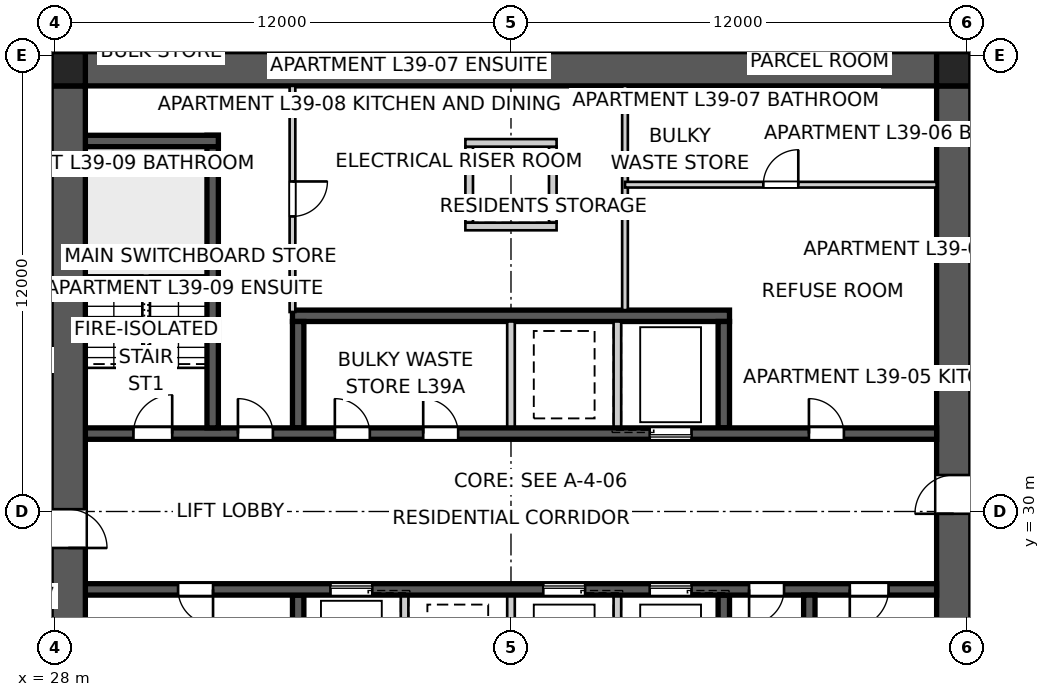
"""IFC4 building model, lengths in metres.
Left out: names, types, materials, properties, quantities, classifications, styles, units other than length and angle.
Written with IfcOpenShell. Run it as: python <this file> out.ifc"""

import sys

from ifc_helpers import new_model, si_unit, direction, frame, frame_2d, origin, origin_2d, place, context, subcontext, project, spatial, polyline, rectangle, outline, extrude, element, fill, save


model = new_model("IFC4")
c1 = context("Model", 3, precision=1e-05, world=origin(), true_north=direction((0.0, 1.0)))
c2 = subcontext(c1, "Body", "Model", "MODEL_VIEW")
j1 = project(units=[si_unit("LENGTHUNIT", "METRE"), si_unit("PLANEANGLEUNIT", "RADIAN")], contexts=[c1])
p1 = place(None, origin())
s1 = spatial("IfcSite", under=j1, at=p1, CompositionType="ELEMENT")
p2 = place(p1, origin())
s2 = spatial("IfcBuilding", under=s1, at=p2, CompositionType="ELEMENT")
p3 = place(p2, frame((0.0, 0.0, 143.8)))
s3 = spatial("IfcBuildingStorey", under=s2, at=p3, CompositionType="ELEMENT", Elevation=143.8)
p4 = place(p3, frame((28.8, 41.65, 0.0), z_axis=(0.0, 0.0, 1.0), x_axis=(1.0, 0.0, 0.0)))
e1 = element("IfcWall", 1, at=p4, inside=s3, PredefinedType="SHEAR", context=c2, shape_type="SweptSolid", body=[
    extrude(outline(polyline([(0.0, -0.45), (22.4, -0.45), (22.4, -0.025), (22.85, -0.025), (22.85, 0.025), (22.4, 0.025), (22.4, 0.45), (0.0, 0.45), (0.0, 0.025), (-0.45, 0.025), (-0.45, -0.025), (0.0, -0.025), (0.0, -0.45)])), origin(), (0.0, 0.0, 1.0), 3.4),
])
p5 = place(p3, frame((51.65, 18.8, 0.0), z_axis=(0.0, 0.0, 1.0), x_axis=(0.0, 1.0, 0.0)))
e2 = element("IfcWall", 2, at=p5, inside=s3, PredefinedType="SHEAR", context=c2, shape_type="SweptSolid", body=[
    extrude(outline(polyline([(0.0, -0.45), (22.4, -0.45), (22.4, -0.025), (22.85, -0.025), (22.85, 0.025), (22.4, 0.025), (22.4, 0.45), (0.0, 0.45), (0.0, 0.025), (-0.45, 0.025), (-0.45, -0.025), (0.0, -0.025), (0.0, -0.45)])), origin(), (0.0, 0.0, 1.0), 3.4),
])
p6 = place(p5, frame((11.14, 0.0, 0.0)))
e3 = element("IfcOpeningElement", 3, at=p6, cuts=e2, PredefinedType="OPENING", context=c2, shape_type="SweptSolid", body=[
    extrude(rectangle(XDim=1.02, YDim=2.4, at=frame_2d((0.51, 1.2))), frame((0.0, 0.46, 0.0), z_axis=(0.0, -1.0, 0.0), x_axis=(1.0, 0.0, 0.0)), (0.0, 0.0, 1.0), 0.92),
])
p7 = place(p3, frame((28.35, 41.2, 0.0), z_axis=(0.0, 0.0, 1.0), x_axis=(0.0, -1.0, 0.0)))
e4 = element("IfcWall", 4, at=p7, inside=s3, PredefinedType="SHEAR", context=c2, shape_type="SweptSolid", body=[
    extrude(outline(polyline([(0.0, -0.45), (22.4, -0.45), (22.4, -0.025), (22.85, -0.025), (22.85, 0.025), (22.4, 0.025), (22.4, 0.45), (0.0, 0.45), (0.0, 0.025), (-0.45, 0.025), (-0.45, -0.025), (0.0, -0.025), (0.0, -0.45)])), origin(), (0.0, 0.0, 1.0), 3.4),
])
p8 = place(p7, frame((11.14, 0.0, 0.0)))
e5 = element("IfcOpeningElement", 5, at=p8, cuts=e4, PredefinedType="OPENING", context=c2, shape_type="SweptSolid", body=[
    extrude(rectangle(XDim=1.02, YDim=2.4, at=frame_2d((0.51, 1.2))), frame((0.0, 0.46, 0.0), z_axis=(0.0, -1.0, 0.0), x_axis=(1.0, 0.0, 0.0)), (0.0, 0.0, 1.0), 0.92),
])
p9 = place(p3, frame((28.8, 32.05, 0.0), z_axis=(0.0, 0.0, 1.0), x_axis=(1.0, 0.0, 0.0)))
e6 = element("IfcWall", 6, at=p9, inside=s3, PredefinedType="SHEAR", context=c2, shape_type="SweptSolid", body=[
    extrude(rectangle(XDim=22.4, YDim=0.3, at=frame_2d((11.2, 0.0))), origin(), (0.0, 0.0, 1.0), 3.4),
])
p10 = place(p9, frame((19.04, 0.0, 0.0)))
e7 = element("IfcOpeningElement", 7, at=p10, cuts=e6, PredefinedType="OPENING", context=c2, shape_type="SweptSolid", body=[
    extrude(rectangle(XDim=0.92, YDim=2.1, at=frame_2d((0.46, 1.05))), frame((0.0, 0.16, 0.0), z_axis=(0.0, -1.0, 0.0), x_axis=(1.0, 0.0, 0.0)), (0.0, 0.0, 1.0), 0.32),
])
p11 = place(p9, frame((1.265, 0.0, 0.0)))
e8 = element("IfcOpeningElement", 8, at=p11, cuts=e6, PredefinedType="OPENING", context=c2, shape_type="SweptSolid", body=[
    extrude(rectangle(XDim=1.02, YDim=2.1, at=frame_2d((0.51, 1.05))), frame((0.0, 0.16, 0.0), z_axis=(0.0, -1.0, 0.0), x_axis=(1.0, 0.0, 0.0)), (0.0, 0.0, 1.0), 0.32),
])
p12 = place(p9, frame((4.015, 0.0, 0.0)))
e9 = element("IfcOpeningElement", 9, at=p12, cuts=e6, PredefinedType="OPENING", context=c2, shape_type="SweptSolid", body=[
    extrude(rectangle(XDim=0.92, YDim=2.1, at=frame_2d((0.46, 1.05))), frame((0.0, 0.16, 0.0), z_axis=(0.0, -1.0, 0.0), x_axis=(1.0, 0.0, 0.0)), (0.0, 0.0, 1.0), 0.32),
])
p13 = place(p9, frame((6.565, 0.0, 0.0)))
e10 = element("IfcOpeningElement", 10, at=p13, cuts=e6, PredefinedType="OPENING", context=c2, shape_type="SweptSolid", body=[
    extrude(rectangle(XDim=0.92, YDim=2.1, at=frame_2d((0.46, 1.05))), frame((0.0, 0.16, 0.0), z_axis=(0.0, -1.0, 0.0), x_axis=(1.0, 0.0, 0.0)), (0.0, 0.0, 1.0), 0.32),
])
p14 = place(p9, frame((8.89, 0.0, 0.0)))
e11 = element("IfcOpeningElement", 11, at=p14, cuts=e6, PredefinedType="OPENING", context=c2, shape_type="SweptSolid", body=[
    extrude(rectangle(XDim=0.92, YDim=2.1, at=frame_2d((0.46, 1.05))), frame((0.0, 0.16, 0.0), z_axis=(0.0, -1.0, 0.0), x_axis=(1.0, 0.0, 0.0)), (0.0, 0.0, 1.0), 0.32),
])
p15 = place(p9, frame((14.85, 0.0, 0.0)))
e12 = element("IfcOpeningElement", 12, at=p15, cuts=e6, PredefinedType="OPENING", context=c2, shape_type="SweptSolid", body=[
    extrude(rectangle(XDim=1.1, YDim=2.1, at=frame_2d((0.55, 1.05))), frame((0.0, 0.16, 0.0), z_axis=(0.0, -1.0, 0.0), x_axis=(1.0, 0.0, 0.0)), (0.0, 0.0, 1.0), 0.32),
])
p16 = place(p3, frame((51.2, 27.95, 0.0), z_axis=(0.0, 0.0, 1.0), x_axis=(-1.0, 0.0, 0.0)))
e13 = element("IfcWall", 13, at=p16, inside=s3, PredefinedType="SHEAR", context=c2, shape_type="SweptSolid", body=[
    extrude(rectangle(XDim=22.4, YDim=0.3, at=frame_2d((11.2, 0.0))), origin(), (0.0, 0.0, 1.0), 3.4),
])
p17 = place(p16, frame((19.04, 0.0, 0.0)))
e14 = element("IfcOpeningElement", 14, at=p17, cuts=e13, PredefinedType="OPENING", context=c2, shape_type="SweptSolid", body=[
    extrude(rectangle(XDim=0.92, YDim=2.1, at=frame_2d((0.46, 1.05))), frame((0.0, 0.16, 0.0), z_axis=(0.0, -1.0, 0.0), x_axis=(1.0, 0.0, 0.0)), (0.0, 0.0, 1.0), 0.32),
])
p18 = place(p16, frame((1.265, 0.0, 0.0)))
e15 = element("IfcOpeningElement", 15, at=p18, cuts=e13, PredefinedType="OPENING", context=c2, shape_type="SweptSolid", body=[
    extrude(rectangle(XDim=1.02, YDim=2.1, at=frame_2d((0.51, 1.05))), frame((0.0, 0.16, 0.0), z_axis=(0.0, -1.0, 0.0), x_axis=(1.0, 0.0, 0.0)), (0.0, 0.0, 1.0), 0.32),
])
p19 = place(p16, frame((4.015, 0.0, 0.0)))
e16 = element("IfcOpeningElement", 16, at=p19, cuts=e13, PredefinedType="OPENING", context=c2, shape_type="SweptSolid", body=[
    extrude(rectangle(XDim=0.92, YDim=2.1, at=frame_2d((0.46, 1.05))), frame((0.0, 0.16, 0.0), z_axis=(0.0, -1.0, 0.0), x_axis=(1.0, 0.0, 0.0)), (0.0, 0.0, 1.0), 0.32),
])
p20 = place(p16, frame((6.45, 0.0, 0.0)))
e17 = element("IfcOpeningElement", 17, at=p20, cuts=e13, PredefinedType="OPENING", context=c2, shape_type="SweptSolid", body=[
    extrude(rectangle(XDim=1.1, YDim=2.1, at=frame_2d((0.55, 1.05))), frame((0.0, 0.16, 0.0), z_axis=(0.0, -1.0, 0.0), x_axis=(1.0, 0.0, 0.0)), (0.0, 0.0, 1.0), 0.32),
])
p21 = place(p16, frame((9.25, 0.0, 0.0)))
e18 = element("IfcOpeningElement", 18, at=p21, cuts=e13, PredefinedType="OPENING", context=c2, shape_type="SweptSolid", body=[
    extrude(rectangle(XDim=1.1, YDim=2.1, at=frame_2d((0.55, 1.05))), frame((0.0, 0.16, 0.0), z_axis=(0.0, -1.0, 0.0), x_axis=(1.0, 0.0, 0.0)), (0.0, 0.0, 1.0), 0.32),
])
p22 = place(p16, frame((14.85, 0.0, 0.0)))
e19 = element("IfcOpeningElement", 19, at=p22, cuts=e13, PredefinedType="OPENING", context=c2, shape_type="SweptSolid", body=[
    extrude(rectangle(XDim=1.1, YDim=2.1, at=frame_2d((0.55, 1.05))), frame((0.0, 0.16, 0.0), z_axis=(0.0, -1.0, 0.0), x_axis=(1.0, 0.0, 0.0)), (0.0, 0.0, 1.0), 0.32),
])
p23 = place(p3, frame((34.25, 35.15, 0.0), z_axis=(0.0, 0.0, 1.0), x_axis=(1.0, 0.0, 0.0)))
e20 = element("IfcWall", 20, at=p23, inside=s3, PredefinedType="SHEAR", context=c2, shape_type="SweptSolid", body=[
    extrude(rectangle(XDim=11.5, YDim=0.3, at=frame_2d((5.75, 0.0))), origin(), (0.0, 0.0, 1.0), 3.4),
])
for number, where, z_axis, x_axis in (
    (21, (34.4, 32.2, 0.0), (0.0, 0.0, 1.0), (0.0, 1.0, 0.0)),
    (22, (45.6, 27.8, 0.0), (0.0, 0.0, 1.0), (0.0, -1.0, 0.0)),
):
    element("IfcWall", number, at=place(p3, frame(where, z_axis=z_axis, x_axis=x_axis)), inside=s3, PredefinedType="SHEAR", context=c2, shape_type="SweptSolid", body=[
        extrude(rectangle(XDim=2.8, YDim=0.3, at=frame_2d((1.4, 0.0))), origin(), (0.0, 0.0, 1.0), 3.4),
    ])
for number, where, z_axis, x_axis in (
    (23, (42.8, 27.8, 0.0), (0.0, 0.0, 1.0), (0.0, -1.0, 0.0)),
    (24, (40.0, 32.2, 0.0), (0.0, 0.0, 1.0), (0.0, 1.0, 0.0)),
    (25, (40.0, 27.8, 0.0), (0.0, 0.0, 1.0), (0.0, -1.0, 0.0)),
    (26, (42.8, 32.2, 0.0), (0.0, 0.0, 1.0), (0.0, 1.0, 0.0)),
    (27, (37.2, 27.8, 0.0), (0.0, 0.0, 1.0), (0.0, -1.0, 0.0)),
):
    element("IfcWall", number, at=place(p3, frame(where, z_axis=z_axis, x_axis=x_axis)), inside=s3, PredefinedType="SOLIDWALL", context=c2, shape_type="SweptSolid", body=[
        extrude(rectangle(XDim=2.8, YDim=0.2, at=frame_2d((1.4, 0.0))), origin(), (0.0, 0.0, 1.0), 3.4),
    ])
for number, where, z_axis, x_axis in (
    (28, (45.6, 32.2, 0.0), (0.0, 0.0, 1.0), (0.0, 1.0, 0.0)),
    (29, (34.4, 27.8, 0.0), (0.0, 0.0, 1.0), (0.0, -1.0, 0.0)),
):
    element("IfcWall", number, at=place(p3, frame(where, z_axis=z_axis, x_axis=x_axis)), inside=s3, PredefinedType="SHEAR", context=c2, shape_type="SweptSolid", body=[
        extrude(rectangle(XDim=2.8, YDim=0.3, at=frame_2d((1.4, 0.0))), origin(), (0.0, 0.0, 1.0), 3.4),
    ])
p24 = place(p3, frame((32.15, 32.2, 0.0), z_axis=(0.0, 0.0, 1.0), x_axis=(0.0, 1.0, 0.0)))
e30 = element("IfcWall", 30, at=p24, inside=s3, PredefinedType="SHEAR", context=c2, shape_type="SweptSolid", body=[
    extrude(rectangle(XDim=7.7, YDim=0.3, at=frame_2d((3.85, 0.0))), origin(), (0.0, 0.0, 1.0), 3.4),
])
p25 = place(p3, frame((28.8, 39.75, 0.0), z_axis=(0.0, 0.0, 1.0), x_axis=(1.0, 0.0, 0.0)))
e31 = element("IfcWall", 31, at=p25, inside=s3, PredefinedType="SHEAR", context=c2, shape_type="SweptSolid", body=[
    extrude(rectangle(XDim=3.5, YDim=0.3, at=frame_2d((1.75, 0.0))), origin(), (0.0, 0.0, 1.0), 3.4),
])
p26 = place(p3, frame((47.85, 27.8, 0.0), z_axis=(0.0, 0.0, 1.0), x_axis=(0.0, -1.0, 0.0)))
e32 = element("IfcWall", 32, at=p26, inside=s3, PredefinedType="SHEAR", context=c2, shape_type="SweptSolid", body=[
    extrude(rectangle(XDim=7.7, YDim=0.3, at=frame_2d((3.85, 0.0))), origin(), (0.0, 0.0, 1.0), 3.4),
])
for number, where, z_axis, x_axis in (
    (33, (38.9, 37.6, 0.0), (0.0, 0.0, 1.0), (0.0, 1.0, 0.0)),
    (34, (41.1, 37.6, 0.0), (0.0, 0.0, 1.0), (0.0, 1.0, 0.0)),
):
    element("IfcWall", number, at=place(p3, frame(where, z_axis=z_axis, x_axis=x_axis)), inside=s3, PredefinedType="SOLIDWALL", context=c2, shape_type="SweptSolid", body=[
        extrude(rectangle(XDim=2.0, YDim=0.2, at=frame_2d((1.0, 0.0))), origin(), (0.0, 0.0, 1.0), 3.4),
    ])
for number, where, z_axis, x_axis in (
    (35, (38.8, 37.5, 0.0), (0.0, 0.0, 1.0), (1.0, 0.0, 0.0)),
    (36, (38.8, 39.7, 0.0), (0.0, 0.0, 1.0), (1.0, 0.0, 0.0)),
):
    element("IfcWall", number, at=place(p3, frame(where, z_axis=z_axis, x_axis=x_axis)), inside=s3, PredefinedType="SOLIDWALL", context=c2, shape_type="SweptSolid", body=[
        extrude(rectangle(XDim=2.4, YDim=0.2, at=frame_2d((1.2, 0.0))), origin(), (0.0, 0.0, 1.0), 3.4),
    ])
for number, where, z_axis, x_axis in (
    (37, (51.65, 41.65, 0.0), (0.0, 0.0, 1.0), (1.0, 0.0, 0.0)),
    (38, (28.35, 41.65, 0.0), (0.0, 0.0, 1.0), (1.0, 0.0, 0.0)),
):
    element("IfcColumn", number, at=place(p3, frame(where, z_axis=z_axis, x_axis=x_axis)), inside=s3, PredefinedType="COLUMN", context=c2, shape_type="SweptSolid", body=[
        extrude(rectangle(XDim=0.9, YDim=0.9, at=origin_2d()), origin(), (0.0, 0.0, 1.0), 3.4),
    ])
p27 = place(p3, frame((34.25, 41.2, 0.0), z_axis=(0.0, 0.0, 1.0), x_axis=(0.0, -1.0, 0.0)))
e39 = element("IfcWall", 39, at=p27, inside=s3, PredefinedType="SOLIDWALL", context=c2, shape_type="SweptSolid", body=[
    extrude(rectangle(XDim=5.95, YDim=0.15, at=frame_2d((2.975, 0.0))), origin(), (0.0, 0.0, 1.0), 3.25),
])
p28 = place(p27, frame((2.515, 0.0, 0.0)))
e40 = element("IfcOpeningElement", 40, at=p28, cuts=e39, PredefinedType="OPENING", context=c2, shape_type="SweptSolid", body=[
    extrude(rectangle(XDim=0.92, YDim=2.1, at=frame_2d((0.46, 1.05))), frame((0.0, 0.085, 0.0), z_axis=(0.0, -1.0, 0.0), x_axis=(1.0, 0.0, 0.0)), (0.0, 0.0, 1.0), 0.17),
])
p29 = place(p3, frame((43.0, 41.2, 0.0), z_axis=(0.0, 0.0, 1.0), x_axis=(0.0, -1.0, 0.0)))
e41 = element("IfcWall", 41, at=p29, inside=s3, PredefinedType="SOLIDWALL", context=c2, shape_type="SweptSolid", body=[
    extrude(rectangle(XDim=5.9, YDim=0.15, at=frame_2d((2.95, 0.0))), origin(), (0.0, 0.0, 1.0), 3.25),
])
p30 = place(p3, frame((43.0, 38.6, 0.0), z_axis=(0.0, 0.0, 1.0), x_axis=(1.0, 0.0, 0.0)))
e42 = element("IfcWall", 42, at=p30, inside=s3, PredefinedType="SOLIDWALL", context=c2, shape_type="SweptSolid", body=[
    extrude(rectangle(XDim=8.2, YDim=0.15, at=frame_2d((4.1, 0.0))), origin(), (0.0, 0.0, 1.0), 3.25),
])
p31 = place(p30, frame((3.64, 0.0, 0.0)))
e43 = element("IfcOpeningElement", 43, at=p31, cuts=e42, PredefinedType="OPENING", context=c2, shape_type="SweptSolid", body=[
    extrude(rectangle(XDim=0.92, YDim=2.1, at=frame_2d((0.46, 1.05))), frame((0.0, 0.085, 0.0), z_axis=(0.0, -1.0, 0.0), x_axis=(1.0, 0.0, 0.0)), (0.0, 0.0, 1.0), 0.17),
])
p32 = place(p3, frame((27.9, 44.35, 0.0), z_axis=(0.0, 0.0, 1.0), x_axis=(0.0, -1.0, 0.0)))
e44 = element("IfcWall", 44, at=p32, inside=s3, PredefinedType="PARTITIONING", context=c2, shape_type="SweptSolid", body=[
    extrude(rectangle(XDim=2.3, YDim=0.2, at=frame_2d((1.15, 0.0))), origin(), (0.0, 0.0, 1.0), 3.25),
])
p33 = place(p3, frame((52.1, 41.18, 0.0), z_axis=(0.0, 0.0, 1.0), x_axis=(0.0, 1.0, 0.0)))
e45 = element("IfcWall", 45, at=p33, inside=s3, PredefinedType="PARTITIONING", context=c2, shape_type="SweptSolid", body=[
    extrude(rectangle(XDim=3.17, YDim=0.2, at=frame_2d((1.585, 0.0))), origin(), (0.0, 0.0, 1.0), 3.25),
])
p34 = place(p10, origin())
e46 = element("IfcDoor", 46, at=p34, inside=s3, OperationType="SINGLE_SWING_LEFT", PredefinedType="DOOR", context=c2, shape_type="SweptSolid", body=[
    extrude(rectangle(XDim=0.92, YDim=2.1, at=frame_2d((0.46, 1.05))), frame((0.0, 0.025, 0.0), z_axis=(0.0, -1.0, 0.0), x_axis=(1.0, 0.0, 0.0)), (0.0, 0.0, 1.0), 0.05),
])
fill(e7, e46)
p35 = place(p17, origin())
e47 = element("IfcDoor", 47, at=p35, inside=s3, OperationType="SINGLE_SWING_LEFT", PredefinedType="DOOR", context=c2, shape_type="SweptSolid", body=[
    extrude(rectangle(XDim=0.92, YDim=2.1, at=frame_2d((0.46, 1.05))), frame((0.0, 0.025, 0.0), z_axis=(0.0, -1.0, 0.0), x_axis=(1.0, 0.0, 0.0)), (0.0, 0.0, 1.0), 0.05),
])
fill(e14, e47)
p36 = place(p18, origin())
e48 = element("IfcDoor", 48, at=p36, inside=s3, OperationType="SINGLE_SWING_RIGHT", PredefinedType="DOOR", context=c2, shape_type="SweptSolid", body=[
    extrude(rectangle(XDim=1.02, YDim=2.1, at=frame_2d((0.51, 1.05))), frame((0.0, 0.025, 0.0), z_axis=(0.0, -1.0, 0.0), x_axis=(1.0, 0.0, 0.0)), (0.0, 0.0, 1.0), 0.05),
])
fill(e15, e48)
p37 = place(p11, origin())
e49 = element("IfcDoor", 49, at=p37, inside=s3, OperationType="SINGLE_SWING_RIGHT", PredefinedType="DOOR", context=c2, shape_type="SweptSolid", body=[
    extrude(rectangle(XDim=1.02, YDim=2.1, at=frame_2d((0.51, 1.05))), frame((0.0, 0.025, 0.0), z_axis=(0.0, -1.0, 0.0), x_axis=(1.0, 0.0, 0.0)), (0.0, 0.0, 1.0), 0.05),
])
fill(e8, e49)
p38 = place(p12, origin())
e50 = element("IfcDoor", 50, at=p38, inside=s3, OperationType="SINGLE_SWING_LEFT", PredefinedType="DOOR", context=c2, shape_type="SweptSolid", body=[
    extrude(rectangle(XDim=0.92, YDim=2.1, at=frame_2d((0.46, 1.05))), frame((0.0, 0.025, 0.0), z_axis=(0.0, -1.0, 0.0), x_axis=(1.0, 0.0, 0.0)), (0.0, 0.0, 1.0), 0.05),
])
fill(e9, e50)
p39 = place(p19, origin())
e51 = element("IfcDoor", 51, at=p39, inside=s3, OperationType="SINGLE_SWING_RIGHT", PredefinedType="DOOR", context=c2, shape_type="SweptSolid", body=[
    extrude(rectangle(XDim=0.92, YDim=2.1, at=frame_2d((0.46, 1.05))), frame((0.0, 0.025, 0.0), z_axis=(0.0, -1.0, 0.0), x_axis=(1.0, 0.0, 0.0)), (0.0, 0.0, 1.0), 0.05),
])
fill(e16, e51)
p40 = place(p31, origin())
e52 = element("IfcDoor", 52, at=p40, inside=s3, OperationType="SINGLE_SWING_RIGHT", PredefinedType="DOOR", context=c2, shape_type="SweptSolid", body=[
    extrude(rectangle(XDim=0.92, YDim=2.1, at=frame_2d((0.46, 1.05))), frame((0.0, 0.025, 0.0), z_axis=(0.0, -1.0, 0.0), x_axis=(1.0, 0.0, 0.0)), (0.0, 0.0, 1.0), 0.05),
])
fill(e43, e52)
p41 = place(p28, origin())
e53 = element("IfcDoor", 53, at=p41, inside=s3, OperationType="SINGLE_SWING_LEFT", PredefinedType="DOOR", context=c2, shape_type="SweptSolid", body=[
    extrude(rectangle(XDim=0.92, YDim=2.1, at=frame_2d((0.46, 1.05))), frame((0.0, 0.025, 0.0), z_axis=(0.0, -1.0, 0.0), x_axis=(1.0, 0.0, 0.0)), (0.0, 0.0, 1.0), 0.05),
])
fill(e40, e53)
p42 = place(p13, origin())
e54 = element("IfcDoor", 54, at=p42, inside=s3, OperationType="SINGLE_SWING_LEFT", PredefinedType="DOOR", context=c2, shape_type="SweptSolid", body=[
    extrude(rectangle(XDim=0.92, YDim=2.1, at=frame_2d((0.46, 1.05))), frame((0.0, 0.025, 0.0), z_axis=(0.0, -1.0, 0.0), x_axis=(1.0, 0.0, 0.0)), (0.0, 0.0, 1.0), 0.05),
])
fill(e10, e54)
p43 = place(p14, origin())
e55 = element("IfcDoor", 55, at=p43, inside=s3, OperationType="SINGLE_SWING_LEFT", PredefinedType="DOOR", context=c2, shape_type="SweptSolid", body=[
    extrude(rectangle(XDim=0.92, YDim=2.1, at=frame_2d((0.46, 1.05))), frame((0.0, 0.025, 0.0), z_axis=(0.0, -1.0, 0.0), x_axis=(1.0, 0.0, 0.0)), (0.0, 0.0, 1.0), 0.05),
])
fill(e11, e55)
p44 = place(p6, origin())
e56 = element("IfcDoor", 56, at=p44, inside=s3, OperationType="SINGLE_SWING_LEFT", PredefinedType="DOOR", context=c2, shape_type="SweptSolid", body=[
    extrude(rectangle(XDim=1.02, YDim=2.4, at=frame_2d((0.51, 1.2))), frame((0.0, 0.025, 0.0), z_axis=(0.0, -1.0, 0.0), x_axis=(1.0, 0.0, 0.0)), (0.0, 0.0, 1.0), 0.05),
])
fill(e3, e56)
p45 = place(p8, origin())
e57 = element("IfcDoor", 57, at=p45, inside=s3, OperationType="SINGLE_SWING_RIGHT", PredefinedType="DOOR", context=c2, shape_type="SweptSolid", body=[
    extrude(rectangle(XDim=1.02, YDim=2.4, at=frame_2d((0.51, 1.2))), frame((0.0, 0.025, 0.0), z_axis=(0.0, -1.0, 0.0), x_axis=(1.0, 0.0, 0.0)), (0.0, 0.0, 1.0), 0.05),
])
fill(e5, e57)
p46 = place(p20, origin())
e58 = element("IfcDoor", 58, at=p46, inside=s3, OperationType="SLIDING_TO_LEFT", PredefinedType="DOOR", context=c2, shape_type="SweptSolid", body=[
    extrude(rectangle(XDim=1.1, YDim=2.1, at=frame_2d((0.55, 1.05))), frame((0.0, 0.025, 0.0), z_axis=(0.0, -1.0, 0.0), x_axis=(1.0, 0.0, 0.0)), (0.0, 0.0, 1.0), 0.05),
])
fill(e17, e58)
p47 = place(p21, origin())
e59 = element("IfcDoor", 59, at=p47, inside=s3, OperationType="SLIDING_TO_LEFT", PredefinedType="DOOR", context=c2, shape_type="SweptSolid", body=[
    extrude(rectangle(XDim=1.1, YDim=2.1, at=frame_2d((0.55, 1.05))), frame((0.0, 0.025, 0.0), z_axis=(0.0, -1.0, 0.0), x_axis=(1.0, 0.0, 0.0)), (0.0, 0.0, 1.0), 0.05),
])
fill(e18, e59)
p48 = place(p15, origin())
e60 = element("IfcDoor", 60, at=p48, inside=s3, OperationType="SLIDING_TO_LEFT", PredefinedType="DOOR", context=c2, shape_type="SweptSolid", body=[
    extrude(rectangle(XDim=1.1, YDim=2.1, at=frame_2d((0.55, 1.05))), frame((0.0, 0.025, 0.0), z_axis=(0.0, -1.0, 0.0), x_axis=(1.0, 0.0, 0.0)), (0.0, 0.0, 1.0), 0.05),
])
fill(e12, e60)
p49 = place(p22, origin())
e61 = element("IfcDoor", 61, at=p49, inside=s3, OperationType="SLIDING_TO_LEFT", PredefinedType="DOOR", context=c2, shape_type="SweptSolid", body=[
    extrude(rectangle(XDim=1.1, YDim=2.1, at=frame_2d((0.55, 1.05))), frame((0.0, 0.025, 0.0), z_axis=(0.0, -1.0, 0.0), x_axis=(1.0, 0.0, 0.0)), (0.0, 0.0, 1.0), 0.05),
])
fill(e19, e61)
save(model, sys.argv[1])
